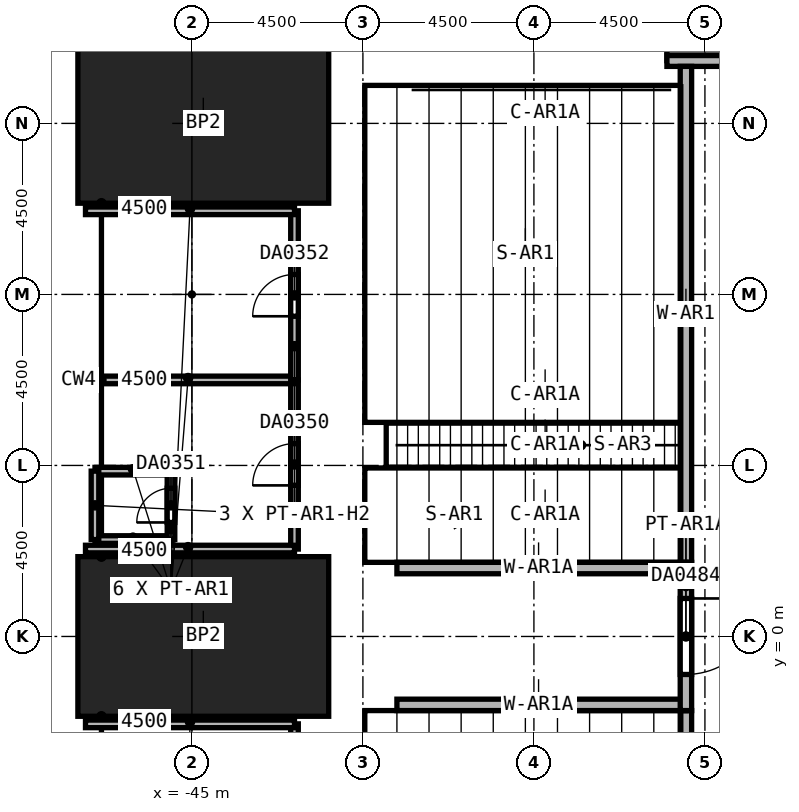
"""IFC4 building model, lengths in metres.
Left out: names, types, materials, properties, quantities, classifications, styles, units other than length and angle.
Written with IfcOpenShell. Run it as: python <this file> out.ifc"""

import sys

from ifc_helpers import new_model, si_unit, direction, frame, frame_2d, origin, origin_2d, place, context, subcontext, project, spatial, rectangle, hollow_rectangle, extrude, element, fill, save


model = new_model("IFC4")
c1 = context("Model", 3, precision=1e-05, world=origin(), true_north=direction((0.0, 1.0)))
c2 = subcontext(c1, "Body", "Model", "MODEL_VIEW")
j1 = project(units=[si_unit("LENGTHUNIT", "METRE"), si_unit("PLANEANGLEUNIT", "RADIAN")], contexts=[c1])
p1 = place(None, origin())
s1 = spatial("IfcSite", under=j1, at=p1, CompositionType="ELEMENT")
p2 = place(p1, origin())
s2 = spatial("IfcBuilding", under=s1, at=p2, CompositionType="ELEMENT")
p3 = place(p2, frame((0.0, 0.0, 12.0)))
s3 = spatial("IfcBuildingStorey", under=s2, at=p3, CompositionType="ELEMENT", Elevation=12.0)
for number, where, z_axis, x_axis in (
    (1, (-44.7, 0.0, 0.0), (0.0, 0.0, 1.0), (0.0, 1.0, 0.0)),
    (2, (-44.7, 13.5, 0.0), (0.0, 0.0, 1.0), (0.0, 1.0, 0.0)),
):
    element("IfcColumn", number, at=place(p3, frame(where, z_axis=z_axis, x_axis=x_axis)), inside=s3, PredefinedType="COLUMN", context=c2, shape_type="SweptSolid", body=[
        extrude(rectangle(XDim=4.2, YDim=6.6, at=origin_2d()), origin(), (0.0, 0.0, 1.0), 7.0),
    ])
p4 = place(p3, frame((-32.5, 15.15, 0.0), z_axis=(0.0, 0.0, 1.0), x_axis=(1.0, 0.0, 0.0)))
e3 = element("IfcWall", 3, at=p4, inside=s3, PredefinedType="SOLIDWALL", context=c2, shape_type="SweptSolid", body=[
    extrude(rectangle(XDim=10.6, YDim=0.3, at=frame_2d((5.3, 0.0))), origin(), (0.0, 0.0, 1.0), 2.125),
])
for number, where, z_axis, x_axis in (
    (4, (-32.0, 15.0, 0.0), (0.0, 0.0, 1.0), (0.0, -1.0, 0.0)),
    (5, (-32.0, -1.95, 0.0), (0.0, 0.0, 1.0), (0.0, -1.0, 0.0)),
):
    element("IfcWall", number, at=place(p3, frame(where, z_axis=z_axis, x_axis=x_axis)), inside=s3, PredefinedType="SOLIDWALL", context=c2, shape_type="SweptSolid", body=[
        extrude(rectangle(XDim=13.05, YDim=0.3, at=frame_2d((6.525, 0.0))), origin(), (0.0, 0.0, 1.0), 2.0),
    ])
for number, where, z_axis, x_axis in (
    (6, (-32.0, 1.8, 0.0), (0.0, 0.0, 1.0), (-1.0, 0.0, 0.0)),
    (7, (-32.0, -1.8, 0.0), (0.0, 0.0, 1.0), (-1.0, 0.0, 0.0)),
):
    element("IfcWall", number, at=place(p3, frame(where, z_axis=z_axis, x_axis=x_axis)), inside=s3, PredefinedType="SOLIDWALL", context=c2, shape_type="SweptSolid", body=[
        extrude(rectangle(XDim=7.605, YDim=0.3, at=frame_2d((3.802, 0.0))), origin(), (0.0, 0.0, 1.0), 7.0),
    ])
for number, where, z_axis, x_axis in (
    (8, (-35.705, 13.78, 0.0), (0.0, 0.0, 1.0), (1.0, 0.0, 0.0)),
    (9, (-35.705, 6.353, 0.0), (0.0, 0.0, 1.0), (1.0, 0.0, 0.0)),
    (10, (-35.705, 3.192, 0.0), (0.0, 0.0, 1.0), (1.0, 0.0, 0.0)),
    (11, (-35.705, 5.033, 0.0), (0.0, 0.0, 1.0), (1.0, 0.0, 0.0)),
):
    element("IfcColumn", number, at=place(p3, frame(where, z_axis=z_axis, x_axis=x_axis)), inside=s3, PredefinedType="COLUMN", context=c2, shape_type="SweptSolid", body=[
        extrude(hollow_rectangle(XDim=0.5, YDim=0.6, WallThickness=0.03, at=origin_2d()), origin(), (0.0, 0.0, 1.0), 3.724),
    ])
p5 = place(p3, frame((-42.3, 2.3, 0.0), z_axis=(0.0, 0.0, 1.0), x_axis=(0.0, 1.0, 0.0)))
e12 = element("IfcWall", 12, at=p5, inside=s3, PredefinedType="PARTITIONING", context=c2, shape_type="SweptSolid", body=[
    extrude(rectangle(XDim=4.45, YDim=0.2, at=frame_2d((2.225, 0.0))), origin(), (0.0, 0.0, 1.0), 5.5),
])
p6 = place(p5, frame((1.675, 0.0, 0.0)))
e13 = element("IfcOpeningElement", 13, at=p6, cuts=e12, PredefinedType="OPENING", context=c2, shape_type="SweptSolid", body=[
    extrude(rectangle(XDim=1.1, YDim=2.4, at=frame_2d((0.55, 1.2))), frame((0.0, 0.1, 0.0), z_axis=(0.0, -1.0, 0.0), x_axis=(1.0, 0.0, 0.0)), (0.0, 0.0, 1.0), 0.2),
])
for number, where, z_axis, x_axis in (
    (14, (-42.3, 2.3, 0.0), (0.0, 0.0, 1.0), (-1.0, 0.0, 0.0)),
    (15, (-47.8, 6.75, 0.0), (0.0, 0.0, 1.0), (1.0, 0.0, 0.0)),
):
    element("IfcWall", number, at=place(p3, frame(where, z_axis=z_axis, x_axis=x_axis)), inside=s3, PredefinedType="PARTITIONING", context=c2, shape_type="SweptSolid", body=[
        extrude(rectangle(XDim=5.5, YDim=0.2, at=frame_2d((2.75, 0.0))), origin(), (0.0, 0.0, 1.0), 6.7),
    ])
for number, where, z_axis, x_axis in (
    (16, (-47.55, 2.55, 0.0), (0.0, 0.0, 1.0), (1.0, 0.0, 0.0)),
    (17, (-45.55, 4.35, 0.0), (0.0, 0.0, 1.0), (-1.0, 0.0, 0.0)),
):
    element("IfcWall", number, at=place(p3, frame(where, z_axis=z_axis, x_axis=x_axis)), inside=s3, PredefinedType="PARTITIONING", context=c2, shape_type="SweptSolid", body=[
        extrude(rectangle(XDim=2.0, YDim=0.2, at=frame_2d((1.0, 0.0))), origin(), (0.0, 0.0, 1.0), 6.7),
    ])
p7 = place(p3, frame((-47.55, 2.55, 0.0), z_axis=(0.0, 0.0, 1.0), x_axis=(0.0, 1.0, 0.0)))
e18 = element("IfcWall", 18, at=p7, inside=s3, PredefinedType="PARTITIONING", context=c2, shape_type="SweptSolid", body=[
    extrude(rectangle(XDim=1.8, YDim=0.2, at=frame_2d((0.9, 0.0))), origin(), (0.0, 0.0, 1.0), 5.5),
])
p8 = place(p3, frame((-45.55, 2.55, 0.0), z_axis=(0.0, 0.0, 1.0), x_axis=(0.0, 1.0, 0.0)))
e19 = element("IfcWall", 19, at=p8, inside=s3, PredefinedType="PARTITIONING", context=c2, shape_type="SweptSolid", body=[
    extrude(rectangle(XDim=1.8, YDim=0.2, at=frame_2d((0.9, 0.0))), origin(), (0.0, 0.0, 1.0), 6.7),
])
p9 = place(p8, frame((0.45, 0.0, 0.0)))
e20 = element("IfcOpeningElement", 20, at=p9, cuts=e19, PredefinedType="OPENING", context=c2, shape_type="SweptSolid", body=[
    extrude(rectangle(XDim=0.9, YDim=2.1, at=frame_2d((0.45, 1.05))), frame((0.0, 0.1, 0.0), z_axis=(0.0, -1.0, 0.0), x_axis=(1.0, 0.0, 0.0)), (0.0, 0.0, 1.0), 0.2),
])
p10 = place(p3, frame((-42.3, 6.75, 0.0), z_axis=(0.0, 0.0, 1.0), x_axis=(0.0, 1.0, 0.0)))
e21 = element("IfcWall", 21, at=p10, inside=s3, PredefinedType="PARTITIONING", context=c2, shape_type="SweptSolid", body=[
    extrude(rectangle(XDim=4.45, YDim=0.2, at=frame_2d((2.225, 0.0))), origin(), (0.0, 0.0, 1.0), 5.5),
])
p11 = place(p10, frame((1.675, 0.0, 0.0)))
e22 = element("IfcOpeningElement", 22, at=p11, cuts=e21, PredefinedType="OPENING", context=c2, shape_type="SweptSolid", body=[
    extrude(rectangle(XDim=1.1, YDim=2.4, at=frame_2d((0.55, 1.2))), frame((0.0, 0.1, 0.0), z_axis=(0.0, -1.0, 0.0), x_axis=(1.0, 0.0, 0.0)), (0.0, 0.0, 1.0), 0.2),
])
p12 = place(p3, frame((-42.3, 11.2, 0.0), z_axis=(0.0, 0.0, 1.0), x_axis=(-1.0, 0.0, 0.0)))
e23 = element("IfcWall", 23, at=p12, inside=s3, PredefinedType="PARTITIONING", context=c2, shape_type="SweptSolid", body=[
    extrude(rectangle(XDim=5.5, YDim=0.2, at=frame_2d((2.75, 0.0))), origin(), (0.0, 0.0, 1.0), 6.7),
])
p13 = place(p3, frame((-42.3, -6.75, 0.0), z_axis=(0.0, 0.0, 1.0), x_axis=(0.0, 1.0, 0.0)))
e24 = element("IfcWall", 24, at=p13, inside=s3, PredefinedType="PARTITIONING", context=c2, shape_type="SweptSolid", body=[
    extrude(rectangle(XDim=4.45, YDim=0.2, at=frame_2d((2.225, 0.0))), origin(), (0.0, 0.0, 1.0), 5.5),
])
p14 = place(p13, frame((1.675, 0.0, 0.0)))
e25 = element("IfcOpeningElement", 25, at=p14, cuts=e24, PredefinedType="OPENING", context=c2, shape_type="SweptSolid", body=[
    extrude(rectangle(XDim=1.1, YDim=2.4, at=frame_2d((0.55, 1.2))), frame((0.0, 0.1, 0.0), z_axis=(0.0, -1.0, 0.0), x_axis=(1.0, 0.0, 0.0)), (0.0, 0.0, 1.0), 0.2),
])
p15 = place(p3, frame((-42.3, -2.3, 0.0), z_axis=(0.0, 0.0, 1.0), x_axis=(-1.0, 0.0, 0.0)))
e26 = element("IfcWall", 26, at=p15, inside=s3, PredefinedType="PARTITIONING", context=c2, shape_type="SweptSolid", body=[
    extrude(rectangle(XDim=5.5, YDim=0.2, at=frame_2d((2.75, 0.0))), origin(), (0.0, 0.0, 1.0), 6.7),
])
p16 = place(p3, frame((-32.0, 1.95, 0.0), z_axis=(0.0, 0.0, 1.0), x_axis=(0.0, -1.0, 0.0)))
e27 = element("IfcWall", 27, at=p16, inside=s3, PredefinedType="PARTITIONING", context=c2, shape_type="SweptSolid", body=[
    extrude(rectangle(XDim=3.9, YDim=0.3, at=frame_2d((1.95, 0.0))), origin(), (0.0, 0.0, 1.0), 2.7),
])
p17 = place(p16, frame((0.95, 0.0, 0.0)))
e28 = element("IfcOpeningElement", 28, at=p17, cuts=e27, PredefinedType="OPENING", context=c2, shape_type="SweptSolid", body=[
    extrude(rectangle(XDim=2.0, YDim=2.4, at=frame_2d((1.0, 1.2))), frame((0.0, 0.15, 0.0), z_axis=(0.0, -1.0, 0.0), x_axis=(1.0, 0.0, 0.0)), (0.0, 0.0, 1.0), 0.3),
])
p18 = place(p6, origin())
e29 = element("IfcDoor", 29, at=p18, inside=s3, OperationType="DOUBLE_DOOR_SINGLE_SWING", PredefinedType="DOOR", context=c2, shape_type="SweptSolid", body=[
    extrude(rectangle(XDim=1.1, YDim=2.4, at=frame_2d((0.55, 1.2))), frame((0.0, 0.025, 0.0), z_axis=(0.0, -1.0, 0.0), x_axis=(1.0, 0.0, 0.0)), (0.0, 0.0, 1.0), 0.05),
])
fill(e13, e29)
p19 = place(p9, origin())
e30 = element("IfcDoor", 30, at=p19, inside=s3, OperationType="SINGLE_SWING_LEFT", PredefinedType="DOOR", context=c2, shape_type="SweptSolid", body=[
    extrude(rectangle(XDim=0.9, YDim=2.1, at=frame_2d((0.45, 1.05))), frame((0.0, 0.025, 0.0), z_axis=(0.0, -1.0, 0.0), x_axis=(1.0, 0.0, 0.0)), (0.0, 0.0, 1.0), 0.05),
])
fill(e20, e30)
p20 = place(p11, origin())
e31 = element("IfcDoor", 31, at=p20, inside=s3, OperationType="DOUBLE_DOOR_SINGLE_SWING", PredefinedType="DOOR", context=c2, shape_type="SweptSolid", body=[
    extrude(rectangle(XDim=1.1, YDim=2.4, at=frame_2d((0.55, 1.2))), frame((0.0, 0.025, 0.0), z_axis=(0.0, -1.0, 0.0), x_axis=(1.0, 0.0, 0.0)), (0.0, 0.0, 1.0), 0.05),
])
fill(e22, e31)
p21 = place(p17, frame((2.0, 0.0, 0.0), z_axis=(0.0, 0.0, 1.0), x_axis=(-1.0, 0.0, 0.0)))
e32 = element("IfcDoor", 32, at=p21, inside=s3, OperationType="DOUBLE_DOOR_SINGLE_SWING", PredefinedType="DOOR", context=c2, shape_type="SweptSolid", body=[
    extrude(rectangle(XDim=2.0, YDim=2.4, at=frame_2d((1.0, 1.2))), frame((0.0, 0.025, 0.0), z_axis=(0.0, -1.0, 0.0), x_axis=(1.0, 0.0, 0.0)), (0.0, 0.0, 1.0), 0.05),
])
fill(e28, e32)
save(model, sys.argv[1])
